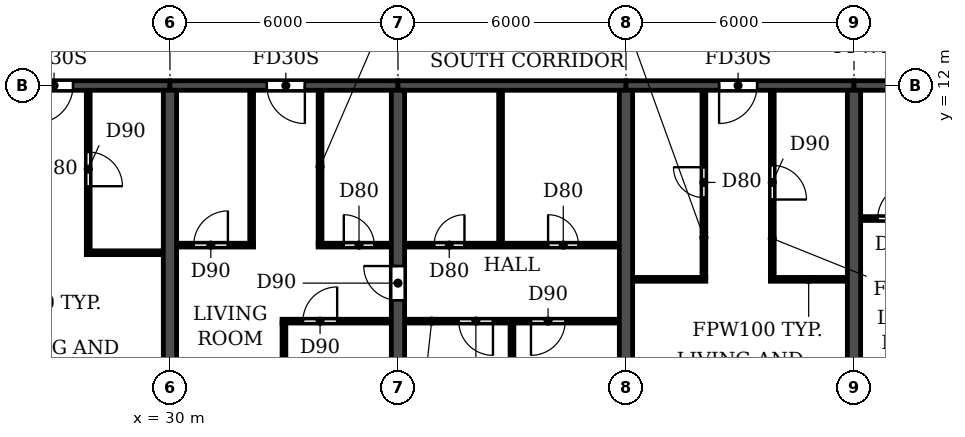
"""IFC4 building model, lengths in metres.
Left out: names, types, materials, properties, quantities, classifications, styles, units other than length and angle.
Written with IfcOpenShell. Run it as: python <this file> out.ifc"""

import sys

from ifc_helpers import new_model, si_unit, direction, frame, frame_2d, origin, place, context, subcontext, project, spatial, rectangle, extrude, element, fill, save


model = new_model("IFC4")
c1 = context("Model", 3, precision=1e-05, world=origin(), true_north=direction((0.0, 1.0)))
c2 = subcontext(c1, "Body", "Model", "MODEL_VIEW")
j1 = project(units=[si_unit("LENGTHUNIT", "METRE"), si_unit("PLANEANGLEUNIT", "RADIAN")], contexts=[c1])
p1 = place(None, origin())
s1 = spatial("IfcSite", under=j1, at=p1, CompositionType="ELEMENT")
p2 = place(p1, origin())
s2 = spatial("IfcBuilding", under=s1, at=p2, CompositionType="ELEMENT")
p3 = place(p2, frame((0.0, 0.0, 112.5)))
s3 = spatial("IfcBuildingStorey", under=s2, at=p3, CompositionType="ELEMENT", Elevation=112.5)
p4 = place(p3, frame((30.0, 0.2, 0.0), z_axis=(0.0, 0.0, 1.0), x_axis=(0.0, 1.0, 0.0)))
e1 = element("IfcWall", 1, at=p4, inside=s3, PredefinedType="SHEAR", context=c2, shape_type="SweptSolid", body=[
    extrude(rectangle(XDim=11.675, YDim=0.35, at=frame_2d((5.837, 0.0))), origin(), (0.0, 0.0, 1.0), 2.95),
])
p5 = place(p3, frame((36.0, 0.2, 0.0), z_axis=(0.0, 0.0, 1.0), x_axis=(0.0, 1.0, 0.0)))
e2 = element("IfcWall", 2, at=p5, inside=s3, PredefinedType="SHEAR", context=c2, shape_type="SweptSolid", body=[
    extrude(rectangle(XDim=11.675, YDim=0.35, at=frame_2d((5.837, 0.0))), origin(), (0.0, 0.0, 1.0), 2.95),
])
p6 = place(p5, frame((6.15, 0.0, 0.0)))
e3 = element("IfcOpeningElement", 3, at=p6, cuts=e2, PredefinedType="OPENING", context=c2, shape_type="SweptSolid", body=[
    extrude(rectangle(XDim=0.9, YDim=2.1, at=frame_2d((0.45, 1.05))), frame((0.0, 0.185, 0.0), z_axis=(0.0, -1.0, 0.0), x_axis=(1.0, 0.0, 0.0)), (0.0, 0.0, 1.0), 0.37),
])
for number, where, z_axis, x_axis in (
    (4, (42.0, 0.2, 0.0), (0.0, 0.0, 1.0), (0.0, 1.0, 0.0)),
    (5, (48.0, 0.2, 0.0), (0.0, 0.0, 1.0), (0.0, 1.0, 0.0)),
):
    element("IfcWall", number, at=place(p3, frame(where, z_axis=z_axis, x_axis=x_axis)), inside=s3, PredefinedType="SHEAR", context=c2, shape_type="SweptSolid", body=[
        extrude(rectangle(XDim=11.675, YDim=0.35, at=frame_2d((5.837, 0.0))), origin(), (0.0, 0.0, 1.0), 2.95),
    ])
p7 = place(p3, frame((24.0, 12.0, 0.0), z_axis=(0.0, 0.0, 1.0), x_axis=(1.0, 0.0, 0.0)))
e6 = element("IfcWall", 6, at=p7, inside=s3, PredefinedType="SHEAR", context=c2, shape_type="SweptSolid", body=[
    extrude(rectangle(XDim=6.0, YDim=0.25, at=frame_2d((3.0, 0.0))), origin(), (0.0, 0.0, 1.0), 2.35),
])
p8 = place(p7, frame((2.45, 0.0, 0.0)))
e7 = element("IfcOpeningElement", 7, at=p8, cuts=e6, PredefinedType="OPENING", context=c2, shape_type="SweptSolid", body=[
    extrude(rectangle(XDim=1.0, YDim=2.1, at=frame_2d((0.5, 1.05))), frame((0.0, 0.135, 0.0), z_axis=(0.0, -1.0, 0.0), x_axis=(1.0, 0.0, 0.0)), (0.0, 0.0, 1.0), 0.27),
])
p9 = place(p3, frame((30.0, 12.0, 0.0), z_axis=(0.0, 0.0, 1.0), x_axis=(1.0, 0.0, 0.0)))
e8 = element("IfcWall", 8, at=p9, inside=s3, PredefinedType="SHEAR", context=c2, shape_type="SweptSolid", body=[
    extrude(rectangle(XDim=6.0, YDim=0.25, at=frame_2d((3.0, 0.0))), origin(), (0.0, 0.0, 1.0), 2.35),
])
p10 = place(p9, frame((2.55, 0.0, 0.0)))
e9 = element("IfcOpeningElement", 9, at=p10, cuts=e8, PredefinedType="OPENING", context=c2, shape_type="SweptSolid", body=[
    extrude(rectangle(XDim=1.0, YDim=2.1, at=frame_2d((0.5, 1.05))), frame((0.0, 0.135, 0.0), z_axis=(0.0, -1.0, 0.0), x_axis=(1.0, 0.0, 0.0)), (0.0, 0.0, 1.0), 0.27),
])
p11 = place(p3, frame((36.0, 12.0, 0.0), z_axis=(0.0, 0.0, 1.0), x_axis=(1.0, 0.0, 0.0)))
e10 = element("IfcWall", 10, at=p11, inside=s3, PredefinedType="SHEAR", context=c2, shape_type="SweptSolid", body=[
    extrude(rectangle(XDim=6.0, YDim=0.25, at=frame_2d((3.0, 0.0))), origin(), (0.0, 0.0, 1.0), 2.35),
])
p12 = place(p3, frame((42.0, 12.0, 0.0), z_axis=(0.0, 0.0, 1.0), x_axis=(1.0, 0.0, 0.0)))
e11 = element("IfcWall", 11, at=p12, inside=s3, PredefinedType="SHEAR", context=c2, shape_type="SweptSolid", body=[
    extrude(rectangle(XDim=6.0, YDim=0.25, at=frame_2d((3.0, 0.0))), origin(), (0.0, 0.0, 1.0), 2.35),
])
p13 = place(p12, frame((2.45, 0.0, 0.0)))
e12 = element("IfcOpeningElement", 12, at=p13, cuts=e11, PredefinedType="OPENING", context=c2, shape_type="SweptSolid", body=[
    extrude(rectangle(XDim=1.0, YDim=2.1, at=frame_2d((0.5, 1.05))), frame((0.0, 0.135, 0.0), z_axis=(0.0, -1.0, 0.0), x_axis=(1.0, 0.0, 0.0)), (0.0, 0.0, 1.0), 0.27),
])
p14 = place(p3, frame((48.0, 12.0, 0.0), z_axis=(0.0, 0.0, 1.0), x_axis=(1.0, 0.0, 0.0)))
e13 = element("IfcWall", 13, at=p14, inside=s3, PredefinedType="SHEAR", context=c2, shape_type="SweptSolid", body=[
    extrude(rectangle(XDim=6.0, YDim=0.25, at=frame_2d((3.0, 0.0))), origin(), (0.0, 0.0, 1.0), 2.35),
])
p15 = place(p14, frame((2.55, 0.0, 0.0)))
e14 = element("IfcOpeningElement", 14, at=p15, cuts=e13, PredefinedType="OPENING", context=c2, shape_type="SweptSolid", body=[
    extrude(rectangle(XDim=1.0, YDim=2.1, at=frame_2d((0.5, 1.05))), frame((0.0, 0.135, 0.0), z_axis=(0.0, -1.0, 0.0), x_axis=(1.0, 0.0, 0.0)), (0.0, 0.0, 1.0), 0.27),
])
p16 = place(p3, frame((32.95, 5.8, 0.0), z_axis=(0.0, 0.0, 1.0), x_axis=(1.0, 0.0, 0.0)))
e15 = element("IfcWall", 15, at=p16, inside=s3, PredefinedType="PARTITIONING", context=c2, shape_type="SweptSolid", body=[
    extrude(rectangle(XDim=2.865, YDim=0.1, at=frame_2d((1.433, 0.0))), origin(), (0.0, 0.0, 1.0), 2.95),
])
p17 = place(p16, frame((0.55, 0.0, 0.0)))
e16 = element("IfcOpeningElement", 16, at=p17, cuts=e15, PredefinedType="OPENING", context=c2, shape_type="SweptSolid", body=[
    extrude(rectangle(XDim=0.9, YDim=2.1, at=frame_2d((0.45, 1.05))), frame((0.0, 0.06, 0.0), z_axis=(0.0, -1.0, 0.0), x_axis=(1.0, 0.0, 0.0)), (0.0, 0.0, 1.0), 0.12),
])
p18 = place(p3, frame((36.185, 5.8, 0.0), z_axis=(0.0, 0.0, 1.0), x_axis=(1.0, 0.0, 0.0)))
e17 = element("IfcWall", 17, at=p18, inside=s3, PredefinedType="PARTITIONING", context=c2, shape_type="SweptSolid", body=[
    extrude(rectangle(XDim=5.63, YDim=0.1, at=frame_2d((2.815, 0.0))), origin(), (0.0, 0.0, 1.0), 2.95),
])
p19 = place(p18, frame((1.415, 0.0, 0.0)))
e18 = element("IfcOpeningElement", 18, at=p19, cuts=e17, PredefinedType="OPENING", context=c2, shape_type="SweptSolid", body=[
    extrude(rectangle(XDim=0.9, YDim=2.1, at=frame_2d((0.45, 1.05))), frame((0.0, 0.06, 0.0), z_axis=(0.0, -1.0, 0.0), x_axis=(1.0, 0.0, 0.0)), (0.0, 0.0, 1.0), 0.12),
])
p20 = place(p18, frame((3.315, 0.0, 0.0)))
e19 = element("IfcOpeningElement", 19, at=p20, cuts=e17, PredefinedType="OPENING", context=c2, shape_type="SweptSolid", body=[
    extrude(rectangle(XDim=0.9, YDim=2.1, at=frame_2d((0.45, 1.05))), frame((0.0, 0.06, 0.0), z_axis=(0.0, -1.0, 0.0), x_axis=(1.0, 0.0, 0.0)), (0.0, 0.0, 1.0), 0.12),
])
p21 = place(p3, frame((42.185, 6.9, 0.0), z_axis=(0.0, 0.0, 1.0), x_axis=(1.0, 0.0, 0.0)))
e20 = element("IfcWall", 20, at=p21, inside=s3, PredefinedType="PARTITIONING", context=c2, shape_type="SweptSolid", body=[
    extrude(rectangle(XDim=1.915, YDim=0.1, at=frame_2d((0.958, 0.0))), origin(), (0.0, 0.0, 1.0), 2.95),
])
for number, where, z_axis, x_axis in (
    (21, (45.8, 6.9, 0.0), (0.0, 0.0, 1.0), (1.0, 0.0, 0.0)),
    (22, (27.8, 7.6, 0.0), (0.0, 0.0, 1.0), (1.0, 0.0, 0.0)),
):
    element("IfcWall", number, at=place(p3, frame(where, z_axis=z_axis, x_axis=x_axis)), inside=s3, PredefinedType="PARTITIONING", context=c2, shape_type="SweptSolid", body=[
        extrude(rectangle(XDim=2.015, YDim=0.1, at=frame_2d((1.007, 0.0))), origin(), (0.0, 0.0, 1.0), 2.95),
    ])
p22 = place(p3, frame((30.185, 7.8, 0.0), z_axis=(0.0, 0.0, 1.0), x_axis=(1.0, 0.0, 0.0)))
e23 = element("IfcWall", 23, at=p22, inside=s3, PredefinedType="PARTITIONING", context=c2, shape_type="SweptSolid", body=[
    extrude(rectangle(XDim=2.015, YDim=0.1, at=frame_2d((1.007, 0.0))), origin(), (0.0, 0.0, 1.0), 2.95),
])
p23 = place(p22, frame((0.44, 0.0, 0.0)))
e24 = element("IfcOpeningElement", 24, at=p23, cuts=e23, PredefinedType="OPENING", context=c2, shape_type="SweptSolid", body=[
    extrude(rectangle(XDim=0.9, YDim=2.1, at=frame_2d((0.45, 1.05))), frame((0.0, 0.06, 0.0), z_axis=(0.0, -1.0, 0.0), x_axis=(1.0, 0.0, 0.0)), (0.0, 0.0, 1.0), 0.12),
])
p24 = place(p3, frame((33.9, 7.8, 0.0), z_axis=(0.0, 0.0, 1.0), x_axis=(1.0, 0.0, 0.0)))
e25 = element("IfcWall", 25, at=p24, inside=s3, PredefinedType="PARTITIONING", context=c2, shape_type="SweptSolid", body=[
    extrude(rectangle(XDim=1.915, YDim=0.1, at=frame_2d((0.958, 0.0))), origin(), (0.0, 0.0, 1.0), 2.95),
])
p25 = place(p24, frame((0.675, 0.0, 0.0)))
e26 = element("IfcOpeningElement", 26, at=p25, cuts=e25, PredefinedType="OPENING", context=c2, shape_type="SweptSolid", body=[
    extrude(rectangle(XDim=0.8, YDim=2.1, at=frame_2d((0.4, 1.05))), frame((0.0, 0.06, 0.0), z_axis=(0.0, -1.0, 0.0), x_axis=(1.0, 0.0, 0.0)), (0.0, 0.0, 1.0), 0.12),
])
p26 = place(p3, frame((36.185, 7.8, 0.0), z_axis=(0.0, 0.0, 1.0), x_axis=(1.0, 0.0, 0.0)))
e27 = element("IfcWall", 27, at=p26, inside=s3, PredefinedType="PARTITIONING", context=c2, shape_type="SweptSolid", body=[
    extrude(rectangle(XDim=5.63, YDim=0.1, at=frame_2d((2.815, 0.0))), origin(), (0.0, 0.0, 1.0), 2.95),
])
p27 = place(p26, frame((0.765, 0.0, 0.0)))
e28 = element("IfcOpeningElement", 28, at=p27, cuts=e27, PredefinedType="OPENING", context=c2, shape_type="SweptSolid", body=[
    extrude(rectangle(XDim=0.8, YDim=2.1, at=frame_2d((0.4, 1.05))), frame((0.0, 0.06, 0.0), z_axis=(0.0, -1.0, 0.0), x_axis=(1.0, 0.0, 0.0)), (0.0, 0.0, 1.0), 0.12),
])
p28 = place(p26, frame((3.765, 0.0, 0.0)))
e29 = element("IfcOpeningElement", 29, at=p28, cuts=e27, PredefinedType="OPENING", context=c2, shape_type="SweptSolid", body=[
    extrude(rectangle(XDim=0.8, YDim=2.1, at=frame_2d((0.4, 1.05))), frame((0.0, 0.06, 0.0), z_axis=(0.0, -1.0, 0.0), x_axis=(1.0, 0.0, 0.0)), (0.0, 0.0, 1.0), 0.12),
])
p29 = place(p3, frame((48.185, 8.5, 0.0), z_axis=(0.0, 0.0, 1.0), x_axis=(1.0, 0.0, 0.0)))
e30 = element("IfcWall", 30, at=p29, inside=s3, PredefinedType="PARTITIONING", context=c2, shape_type="SweptSolid", body=[
    extrude(rectangle(XDim=2.015, YDim=0.1, at=frame_2d((1.007, 0.0))), origin(), (0.0, 0.0, 1.0), 2.95),
])
p30 = place(p29, frame((0.44, 0.0, 0.0)))
e31 = element("IfcOpeningElement", 31, at=p30, cuts=e30, PredefinedType="OPENING", context=c2, shape_type="SweptSolid", body=[
    extrude(rectangle(XDim=0.9, YDim=2.1, at=frame_2d((0.45, 1.05))), frame((0.0, 0.06, 0.0), z_axis=(0.0, -1.0, 0.0), x_axis=(1.0, 0.0, 0.0)), (0.0, 0.0, 1.0), 0.12),
])
p31 = place(p3, frame((27.85, 7.65, 0.0), z_axis=(0.0, 0.0, 1.0), x_axis=(0.0, 1.0, 0.0)))
e32 = element("IfcWall", 32, at=p31, inside=s3, PredefinedType="PARTITIONING", context=c2, shape_type="SweptSolid", body=[
    extrude(rectangle(XDim=4.215, YDim=0.1, at=frame_2d((2.107, 0.0))), origin(), (0.0, 0.0, 1.0), 2.95),
])
p32 = place(p31, frame((1.7, 0.0, 0.0)))
e33 = element("IfcOpeningElement", 33, at=p32, cuts=e32, PredefinedType="OPENING", context=c2, shape_type="SweptSolid", body=[
    extrude(rectangle(XDim=0.9, YDim=2.1, at=frame_2d((0.45, 1.05))), frame((0.0, 0.06, 0.0), z_axis=(0.0, -1.0, 0.0), x_axis=(1.0, 0.0, 0.0)), (0.0, 0.0, 1.0), 0.12),
])
p33 = place(p3, frame((32.15, 7.85, 0.0), z_axis=(0.0, 0.0, 1.0), x_axis=(0.0, 1.0, 0.0)))
e34 = element("IfcWall", 34, at=p33, inside=s3, PredefinedType="PARTITIONING", context=c2, shape_type="SweptSolid", body=[
    extrude(rectangle(XDim=4.015, YDim=0.1, at=frame_2d((2.007, 0.0))), origin(), (0.0, 0.0, 1.0), 2.95),
])
p34 = place(p3, frame((33.0, 0.06, 0.0), z_axis=(0.0, 0.0, 1.0), x_axis=(0.0, 1.0, 0.0)))
e35 = element("IfcWall", 35, at=p34, inside=s3, PredefinedType="PARTITIONING", context=c2, shape_type="SweptSolid", body=[
    extrude(rectangle(XDim=5.69, YDim=0.1, at=frame_2d((2.845, 0.0))), origin(), (0.0, 0.0, 1.0), 2.95),
])
for number, where, z_axis, x_axis in (
    (36, (33.95, 7.85, 0.0), (0.0, 0.0, 1.0), (0.0, 1.0, 0.0)),
    (37, (38.7, 7.85, 0.0), (0.0, 0.0, 1.0), (0.0, 1.0, 0.0)),
):
    element("IfcWall", number, at=place(p3, frame(where, z_axis=z_axis, x_axis=x_axis)), inside=s3, PredefinedType="PARTITIONING", context=c2, shape_type="SweptSolid", body=[
        extrude(rectangle(XDim=4.015, YDim=0.1, at=frame_2d((2.007, 0.0))), origin(), (0.0, 0.0, 1.0), 2.95),
    ])
p35 = place(p3, frame((39.0, 0.06, 0.0), z_axis=(0.0, 0.0, 1.0), x_axis=(0.0, 1.0, 0.0)))
e38 = element("IfcWall", 38, at=p35, inside=s3, PredefinedType="PARTITIONING", context=c2, shape_type="SweptSolid", body=[
    extrude(rectangle(XDim=5.69, YDim=0.1, at=frame_2d((2.845, 0.0))), origin(), (0.0, 0.0, 1.0), 2.95),
])
p36 = place(p3, frame((44.05, 6.95, 0.0), z_axis=(0.0, 0.0, 1.0), x_axis=(0.0, 1.0, 0.0)))
e39 = element("IfcWall", 39, at=p36, inside=s3, PredefinedType="PARTITIONING", context=c2, shape_type="SweptSolid", body=[
    extrude(rectangle(XDim=4.915, YDim=0.1, at=frame_2d((2.458, 0.0))), origin(), (0.0, 0.0, 1.0), 2.95),
])
p37 = place(p36, frame((2.1, 0.0, 0.0)))
e40 = element("IfcOpeningElement", 40, at=p37, cuts=e39, PredefinedType="OPENING", context=c2, shape_type="SweptSolid", body=[
    extrude(rectangle(XDim=0.8, YDim=2.1, at=frame_2d((0.4, 1.05))), frame((0.0, 0.06, 0.0), z_axis=(0.0, -1.0, 0.0), x_axis=(1.0, 0.0, 0.0)), (0.0, 0.0, 1.0), 0.12),
])
p38 = place(p3, frame((45.85, 6.95, 0.0), z_axis=(0.0, 0.0, 1.0), x_axis=(0.0, 1.0, 0.0)))
e41 = element("IfcWall", 41, at=p38, inside=s3, PredefinedType="PARTITIONING", context=c2, shape_type="SweptSolid", body=[
    extrude(rectangle(XDim=4.915, YDim=0.1, at=frame_2d((2.458, 0.0))), origin(), (0.0, 0.0, 1.0), 2.95),
])
p39 = place(p38, frame((2.05, 0.0, 0.0)))
e42 = element("IfcOpeningElement", 42, at=p39, cuts=e41, PredefinedType="OPENING", context=c2, shape_type="SweptSolid", body=[
    extrude(rectangle(XDim=0.9, YDim=2.1, at=frame_2d((0.45, 1.05))), frame((0.0, 0.06, 0.0), z_axis=(0.0, -1.0, 0.0), x_axis=(1.0, 0.0, 0.0)), (0.0, 0.0, 1.0), 0.12),
])
p40 = place(p8, frame((1.0, 0.0, 0.0), z_axis=(0.0, 0.0, 1.0), x_axis=(-1.0, 0.0, 0.0)))
e43 = element("IfcDoor", 43, at=p40, inside=s3, OperationType="SINGLE_SWING_RIGHT", PredefinedType="DOOR", context=c2, shape_type="SweptSolid", body=[
    extrude(rectangle(XDim=1.0, YDim=2.1, at=frame_2d((0.5, 1.05))), frame((0.0, 0.025, 0.0), z_axis=(0.0, -1.0, 0.0), x_axis=(1.0, 0.0, 0.0)), (0.0, 0.0, 1.0), 0.05),
])
fill(e7, e43)
p41 = place(p32, frame((0.9, 0.0, 0.0), z_axis=(0.0, 0.0, 1.0), x_axis=(-1.0, 0.0, 0.0)))
e44 = element("IfcDoor", 44, at=p41, inside=s3, OperationType="SINGLE_SWING_RIGHT", PredefinedType="DOOR", context=c2, shape_type="SweptSolid", body=[
    extrude(rectangle(XDim=0.9, YDim=2.1, at=frame_2d((0.45, 1.05))), frame((0.0, 0.025, 0.0), z_axis=(0.0, -1.0, 0.0), x_axis=(1.0, 0.0, 0.0)), (0.0, 0.0, 1.0), 0.05),
])
fill(e33, e44)
p42 = place(p27, origin())
e45 = element("IfcDoor", 45, at=p42, inside=s3, OperationType="SINGLE_SWING_RIGHT", PredefinedType="DOOR", context=c2, shape_type="SweptSolid", body=[
    extrude(rectangle(XDim=0.8, YDim=2.1, at=frame_2d((0.4, 1.05))), frame((0.0, 0.025, 0.0), z_axis=(0.0, -1.0, 0.0), x_axis=(1.0, 0.0, 0.0)), (0.0, 0.0, 1.0), 0.05),
])
fill(e28, e45)
p43 = place(p19, frame((0.9, 0.0, 0.0), z_axis=(0.0, 0.0, 1.0), x_axis=(-1.0, 0.0, 0.0)))
e46 = element("IfcDoor", 46, at=p43, inside=s3, OperationType="SINGLE_SWING_LEFT", PredefinedType="DOOR", context=c2, shape_type="SweptSolid", body=[
    extrude(rectangle(XDim=0.9, YDim=2.1, at=frame_2d((0.45, 1.05))), frame((0.0, 0.025, 0.0), z_axis=(0.0, -1.0, 0.0), x_axis=(1.0, 0.0, 0.0)), (0.0, 0.0, 1.0), 0.05),
])
fill(e18, e46)
p44 = place(p20, frame((0.9, 0.0, 0.0), z_axis=(0.0, 0.0, 1.0), x_axis=(-1.0, 0.0, 0.0)))
e47 = element("IfcDoor", 47, at=p44, inside=s3, OperationType="SINGLE_SWING_RIGHT", PredefinedType="DOOR", context=c2, shape_type="SweptSolid", body=[
    extrude(rectangle(XDim=0.9, YDim=2.1, at=frame_2d((0.45, 1.05))), frame((0.0, 0.025, 0.0), z_axis=(0.0, -1.0, 0.0), x_axis=(1.0, 0.0, 0.0)), (0.0, 0.0, 1.0), 0.05),
])
fill(e19, e47)
p45 = place(p28, origin())
e48 = element("IfcDoor", 48, at=p45, inside=s3, OperationType="SINGLE_SWING_LEFT", PredefinedType="DOOR", context=c2, shape_type="SweptSolid", body=[
    extrude(rectangle(XDim=0.8, YDim=2.1, at=frame_2d((0.4, 1.05))), frame((0.0, 0.025, 0.0), z_axis=(0.0, -1.0, 0.0), x_axis=(1.0, 0.0, 0.0)), (0.0, 0.0, 1.0), 0.05),
])
fill(e29, e48)
p46 = place(p23, origin())
e49 = element("IfcDoor", 49, at=p46, inside=s3, OperationType="SINGLE_SWING_RIGHT", PredefinedType="DOOR", context=c2, shape_type="SweptSolid", body=[
    extrude(rectangle(XDim=0.9, YDim=2.1, at=frame_2d((0.45, 1.05))), frame((0.0, 0.025, 0.0), z_axis=(0.0, -1.0, 0.0), x_axis=(1.0, 0.0, 0.0)), (0.0, 0.0, 1.0), 0.05),
])
fill(e24, e49)
p47 = place(p10, frame((1.0, 0.0, 0.0), z_axis=(0.0, 0.0, 1.0), x_axis=(-1.0, 0.0, 0.0)))
e50 = element("IfcDoor", 50, at=p47, inside=s3, OperationType="SINGLE_SWING_LEFT", PredefinedType="DOOR", context=c2, shape_type="SweptSolid", body=[
    extrude(rectangle(XDim=1.0, YDim=2.1, at=frame_2d((0.5, 1.05))), frame((0.0, 0.025, 0.0), z_axis=(0.0, -1.0, 0.0), x_axis=(1.0, 0.0, 0.0)), (0.0, 0.0, 1.0), 0.05),
])
fill(e9, e50)
p48 = place(p17, origin())
e51 = element("IfcDoor", 51, at=p48, inside=s3, OperationType="SINGLE_SWING_RIGHT", PredefinedType="DOOR", context=c2, shape_type="SweptSolid", body=[
    extrude(rectangle(XDim=0.9, YDim=2.1, at=frame_2d((0.45, 1.05))), frame((0.0, 0.025, 0.0), z_axis=(0.0, -1.0, 0.0), x_axis=(1.0, 0.0, 0.0)), (0.0, 0.0, 1.0), 0.05),
])
fill(e16, e51)
p49 = place(p25, origin())
e52 = element("IfcDoor", 52, at=p49, inside=s3, OperationType="SINGLE_SWING_LEFT", PredefinedType="DOOR", context=c2, shape_type="SweptSolid", body=[
    extrude(rectangle(XDim=0.8, YDim=2.1, at=frame_2d((0.4, 1.05))), frame((0.0, 0.025, 0.0), z_axis=(0.0, -1.0, 0.0), x_axis=(1.0, 0.0, 0.0)), (0.0, 0.0, 1.0), 0.05),
])
fill(e26, e52)
p50 = place(p6, origin())
e53 = element("IfcDoor", 53, at=p50, inside=s3, OperationType="SINGLE_SWING_RIGHT", PredefinedType="DOOR", context=c2, shape_type="SweptSolid", body=[
    extrude(rectangle(XDim=0.9, YDim=2.1, at=frame_2d((0.45, 1.05))), frame((0.0, 0.025, 0.0), z_axis=(0.0, -1.0, 0.0), x_axis=(1.0, 0.0, 0.0)), (0.0, 0.0, 1.0), 0.05),
])
fill(e3, e53)
p51 = place(p37, origin())
e54 = element("IfcDoor", 54, at=p51, inside=s3, OperationType="SINGLE_SWING_RIGHT", PredefinedType="DOOR", context=c2, shape_type="SweptSolid", body=[
    extrude(rectangle(XDim=0.8, YDim=2.1, at=frame_2d((0.4, 1.05))), frame((0.0, 0.025, 0.0), z_axis=(0.0, -1.0, 0.0), x_axis=(1.0, 0.0, 0.0)), (0.0, 0.0, 1.0), 0.05),
])
fill(e40, e54)
p52 = place(p13, frame((1.0, 0.0, 0.0), z_axis=(0.0, 0.0, 1.0), x_axis=(-1.0, 0.0, 0.0)))
e55 = element("IfcDoor", 55, at=p52, inside=s3, OperationType="SINGLE_SWING_RIGHT", PredefinedType="DOOR", context=c2, shape_type="SweptSolid", body=[
    extrude(rectangle(XDim=1.0, YDim=2.1, at=frame_2d((0.5, 1.05))), frame((0.0, 0.025, 0.0), z_axis=(0.0, -1.0, 0.0), x_axis=(1.0, 0.0, 0.0)), (0.0, 0.0, 1.0), 0.05),
])
fill(e12, e55)
p53 = place(p39, frame((0.9, 0.0, 0.0), z_axis=(0.0, 0.0, 1.0), x_axis=(-1.0, 0.0, 0.0)))
e56 = element("IfcDoor", 56, at=p53, inside=s3, OperationType="SINGLE_SWING_RIGHT", PredefinedType="DOOR", context=c2, shape_type="SweptSolid", body=[
    extrude(rectangle(XDim=0.9, YDim=2.1, at=frame_2d((0.45, 1.05))), frame((0.0, 0.025, 0.0), z_axis=(0.0, -1.0, 0.0), x_axis=(1.0, 0.0, 0.0)), (0.0, 0.0, 1.0), 0.05),
])
fill(e42, e56)
p54 = place(p30, origin())
e57 = element("IfcDoor", 57, at=p54, inside=s3, OperationType="SINGLE_SWING_RIGHT", PredefinedType="DOOR", context=c2, shape_type="SweptSolid", body=[
    extrude(rectangle(XDim=0.9, YDim=2.1, at=frame_2d((0.45, 1.05))), frame((0.0, 0.025, 0.0), z_axis=(0.0, -1.0, 0.0), x_axis=(1.0, 0.0, 0.0)), (0.0, 0.0, 1.0), 0.05),
])
fill(e31, e57)
save(model, sys.argv[1])
